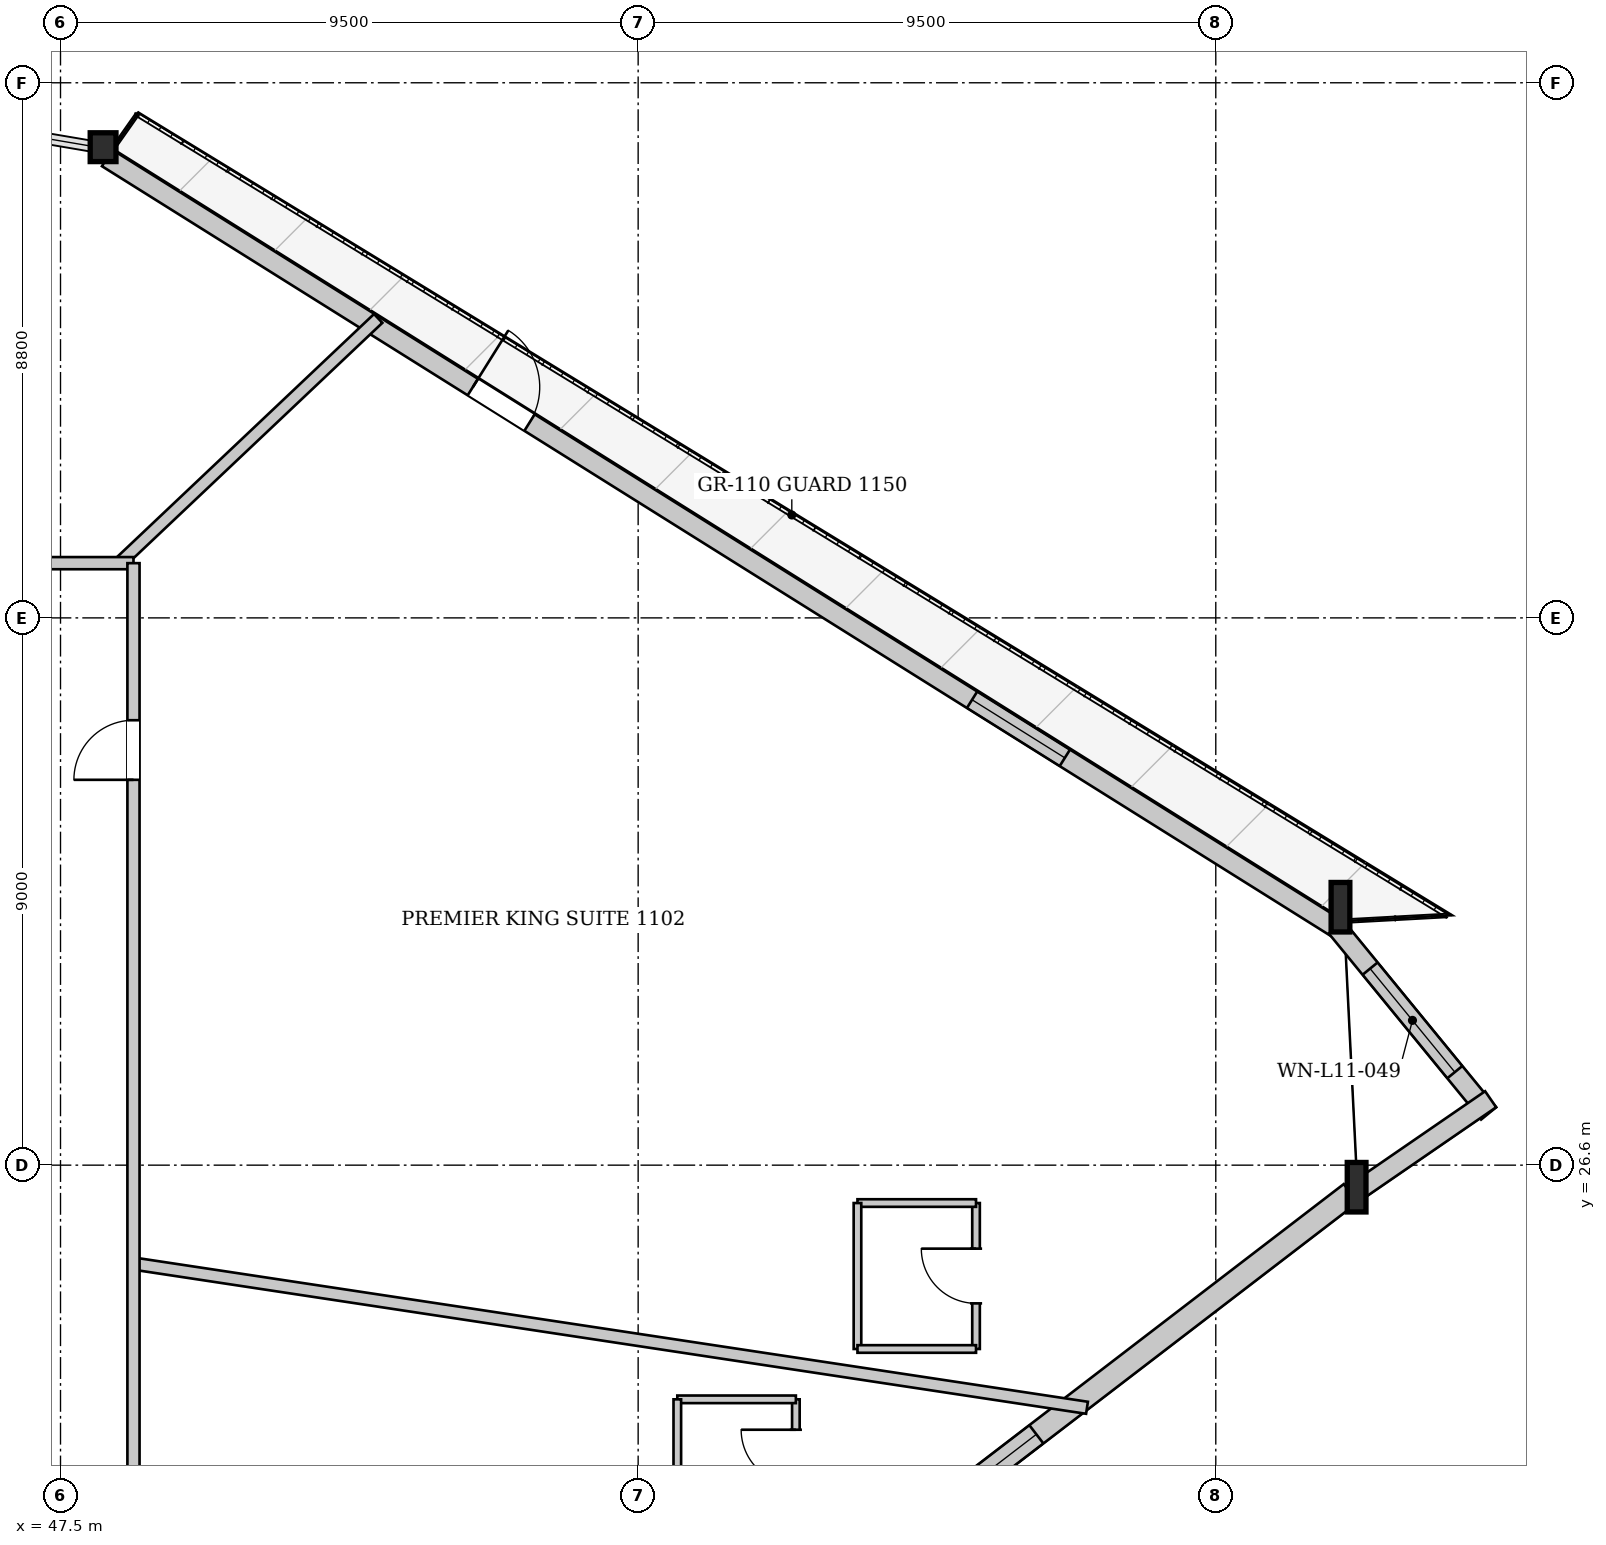
"""IFC4 building model, lengths in metres.
Left out: names, types, materials, properties, quantities, classifications, styles, units other than length and angle.
Written with IfcOpenShell. Run it as: python <this file> out.ifc"""

import sys

from ifc_helpers import new_model, si_unit, direction, frame, frame_2d, origin, origin_2d, place, context, subcontext, project, spatial, rectangle, i_section, extrude, source, transform, mapped, element, fill, save


model = new_model("IFC4")
c1 = context("Model", 3, precision=1e-05, world=origin(), true_north=direction((0.0, 1.0)))
c2 = subcontext(c1, "Body", "Model", "MODEL_VIEW")
j1 = project(units=[si_unit("LENGTHUNIT", "METRE"), si_unit("PLANEANGLEUNIT", "RADIAN")], contexts=[c1])
p1 = place(None, origin())
s1 = spatial("IfcSite", under=j1, at=p1, CompositionType="ELEMENT")
p2 = place(p1, origin())
s2 = spatial("IfcBuilding", under=s1, at=p2, CompositionType="ELEMENT")
p3 = place(p2, frame((0.0, 0.0, 47.05)))
s3 = spatial("IfcBuildingStorey", under=s2, at=p3, CompositionType="ELEMENT", Elevation=47.05)
m1 = source(origin(), c2, "Body", "SweptSolid", [
    extrude(i_section(OverallWidth=0.308, OverallDepth=0.814, WebThickness=0.021, FlangeThickness=0.04, at=origin_2d()), origin(), (0.0, 0.0, 1.0), 3.422),
])
p4 = place(p3, frame((68.836, 25.987, 0.0), z_axis=(-0.011557789288, 0.146184631177, 0.989189805404), x_axis=(-0.996889101356, -0.078817000693, 0.0)))
e1 = element("IfcColumn", 1, at=p4, inside=s3, PredefinedType="COLUMN", context=c2, shape_type="MappedRepresentation", body=[
    mapped(m1, transform((0.0, 0.0, 0.0), x_axis=(1.0, 0.0, 0.0), y_axis=(0.0, 1.0, 0.0), z_axis=(0.0, 0.0, 1.0), scale=1.0)),
])
m2 = source(origin(), c2, "Body", "SweptSolid", [
    extrude(i_section(OverallWidth=0.308, OverallDepth=0.814, WebThickness=0.021, FlangeThickness=0.04, at=origin_2d()), origin(), (0.0, 0.0, 1.0), 3.417),
])
p5 = place(p3, frame((68.606, 30.613, 0.0), z_axis=(-0.032146436914, 0.13394348714, 0.990467439569), x_axis=(-0.972387301981, -0.233372952475, 0.0)))
e2 = element("IfcColumn", 2, at=p5, inside=s3, PredefinedType="COLUMN", context=c2, shape_type="MappedRepresentation", body=[
    mapped(m2, transform((0.0, 0.0, 0.0), x_axis=(1.0, 0.0, 0.0), y_axis=(0.0, 1.0, 0.0), z_axis=(0.0, 0.0, 1.0), scale=1.0)),
])
m3 = source(origin(), c2, "Body", "SweptSolid", [
    extrude(i_section(OverallWidth=0.424, OverallDepth=0.474, WebThickness=0.043, FlangeThickness=0.068, at=origin_2d()), origin(), (0.0, 0.0, 1.0), 3.399),
])
p6 = place(p3, frame((48.351, 43.299, 0.0), z_axis=(-0.088695640975, 0.02434641481, 0.995761183898), x_axis=(-0.264702744163, -0.96433005617, 0.0)))
e3 = element("IfcColumn", 3, at=p6, inside=s3, PredefinedType="COLUMN", context=c2, shape_type="MappedRepresentation", body=[
    mapped(m3, transform((0.0, 0.0, 0.0), x_axis=(1.0, 0.0, 0.0), y_axis=(0.0, 1.0, 0.0), z_axis=(0.0, 0.0, 1.0), scale=1.0)),
])
p7 = place(p3, frame((48.266, 43.164, 0.0), z_axis=(0.0, 0.0, 1.0), x_axis=(0.847483127108, -0.530822333053, 0.0)))
e4 = element("IfcWall", 4, at=p7, inside=s3, PredefinedType="SOLIDWALL", context=c2, shape_type="SweptSolid", body=[
    extrude(rectangle(XDim=23.9, YDim=0.32, at=frame_2d((11.95, 0.0))), origin(), (0.0, 0.0, 1.0), 2.592),
])
p8 = place(p7, frame((7.098, 0.0, 0.0)))
e5 = element("IfcOpeningElement", 5, at=p8, cuts=e4, PredefinedType="OPENING", context=c2, shape_type="SweptSolid", body=[
    extrude(rectangle(XDim=1.1, YDim=2.3, at=frame_2d((0.55, 1.15))), frame((0.0, 0.17, 0.0), z_axis=(0.0, -1.0, 0.0), x_axis=(1.0, 0.0, 0.0)), (0.0, 0.0, 1.0), 0.34),
])
p9 = place(p7, frame((16.786, 0.0, 0.272)))
e6 = element("IfcOpeningElement", 6, at=p9, cuts=e4, PredefinedType="OPENING", context=c2, shape_type="SweptSolid", body=[
    extrude(rectangle(XDim=1.8, YDim=2.2, at=frame_2d((0.9, 1.1))), frame((0.0, 0.17, 0.0), z_axis=(0.0, -1.0, 0.0), x_axis=(1.0, 0.0, 0.0)), (0.0, 0.0, 1.0), 0.34),
])
p10 = place(p3, frame((68.482, 30.512, 0.0), z_axis=(0.0, 0.0, 1.0), x_axis=(0.63340917895, -0.773817040405, 0.0)))
e7 = element("IfcWall", 7, at=p10, inside=s3, PredefinedType="SOLIDWALL", context=c2, shape_type="SweptSolid", body=[
    extrude(rectangle(XDim=3.956, YDim=0.32, at=frame_2d((1.978, 0.0))), origin(), (0.0, 0.0, 1.0), 2.592),
])
p11 = place(p10, frame((0.878, 0.0, 0.222)))
e8 = element("IfcOpeningElement", 8, at=p11, cuts=e7, PredefinedType="OPENING", context=c2, shape_type="SweptSolid", body=[
    extrude(rectangle(XDim=2.2, YDim=2.25, at=frame_2d((1.1, 1.125))), frame((0.0, 0.17, 0.0), z_axis=(0.0, -1.0, 0.0), x_axis=(1.0, 0.0, 0.0)), (0.0, 0.0, 1.0), 0.34),
])
p12 = place(p3, frame((71.02, 27.684, 0.0), z_axis=(0.0, 0.0, 1.0), x_axis=(-0.823923227302, -0.56670143419, 0.0)))
e9 = element("IfcWall", 9, at=p12, inside=s3, PredefinedType="SOLIDWALL", context=c2, shape_type="SweptSolid", body=[
    extrude(rectangle(XDim=2.761, YDim=0.32, at=frame_2d((1.38, 0.0))), origin(), (0.0, 0.0, 1.0), 2.592),
])
p13 = place(p3, frame((68.72, 26.138, 0.0), z_axis=(0.0, 0.0, 1.0), x_axis=(-0.793606361292, -0.608431543657, 0.0)))
e10 = element("IfcWall", 10, at=p13, inside=s3, PredefinedType="SOLIDWALL", context=c2, shape_type="SweptSolid", body=[
    extrude(rectangle(XDim=24.521, YDim=0.38, at=frame_2d((12.261, 0.0))), origin(), (0.0, 0.0, 1.0), 2.592),
])
p14 = place(p13, frame((6.516, 0.0, 0.222)))
e11 = element("IfcOpeningElement", 11, at=p14, cuts=e10, PredefinedType="OPENING", context=c2, shape_type="SweptSolid", body=[
    extrude(rectangle(XDim=2.2, YDim=2.25, at=frame_2d((1.1, 1.125))), frame((0.0, 0.2, 0.0), z_axis=(0.0, -1.0, 0.0), x_axis=(1.0, 0.0, 0.0)), (0.0, 0.0, 1.0), 0.4),
])
p15 = place(p13, frame((16.555, 0.0, 0.222)))
e12 = element("IfcOpeningElement", 12, at=p15, cuts=e10, PredefinedType="OPENING", context=c2, shape_type="SweptSolid", body=[
    extrude(rectangle(XDim=2.2, YDim=2.25, at=frame_2d((1.1, 1.125))), frame((0.0, 0.2, 0.0), z_axis=(0.0, -1.0, 0.0), x_axis=(1.0, 0.0, 0.0)), (0.0, 0.0, 1.0), 0.4),
])
p16 = place(p3, frame((48.7, 24.982, 0.0), z_axis=(0.0, 0.0, 1.0), x_axis=(0.988756783169, -0.149532684514, 0.0)))
e13 = element("IfcWall", 13, at=p16, inside=s3, PredefinedType="PARTITIONING", context=c2, shape_type="SweptSolid", body=[
    extrude(rectangle(XDim=15.86, YDim=0.2, at=frame_2d((7.93, 0.0))), origin(), (0.0, 0.0, 1.0), 3.3),
])
p17 = place(p3, frame((48.469, 36.5, 0.0), z_axis=(0.0, 0.0, 1.0), x_axis=(0.726587633049, 0.687073803532, 0.0)))
e14 = element("IfcWall", 14, at=p17, inside=s3, PredefinedType="PARTITIONING", context=c2, shape_type="SweptSolid", body=[
    extrude(rectangle(XDim=5.857, YDim=0.2, at=frame_2d((2.929, 0.0))), origin(), (0.0, 0.0, 1.0), 3.3),
])
p18 = place(p3, frame((59.594, 20.849, 0.0), z_axis=(0.0, 0.0, 1.0), x_axis=(0.0, 1.0, 0.0)))
e15 = element("IfcWall", 15, at=p18, inside=s3, PredefinedType="PARTITIONING", context=c2, shape_type="SweptSolid", body=[
    extrude(rectangle(XDim=1.9, YDim=0.125, at=frame_2d((0.95, 0.0))), origin(), (0.0, 0.0, 1.0), 3.3),
])
p19 = place(p18, frame((0.5, 0.0, 0.0)))
e16 = element("IfcOpeningElement", 16, at=p19, cuts=e15, PredefinedType="OPENING", context=c2, shape_type="SweptSolid", body=[
    extrude(rectangle(XDim=0.9, YDim=2.1, at=frame_2d((0.45, 1.05))), frame((0.0, 0.073, 0.0), z_axis=(0.0, -1.0, 0.0), x_axis=(1.0, 0.0, 0.0)), (0.0, 0.0, 1.0), 0.145),
])
p20 = place(p3, frame((59.594, 22.749, 0.0), z_axis=(0.0, 0.0, 1.0), x_axis=(-1.0, 0.0, 0.0)))
e17 = element("IfcWall", 17, at=p20, inside=s3, PredefinedType="PARTITIONING", context=c2, shape_type="SweptSolid", body=[
    extrude(rectangle(XDim=1.95, YDim=0.125, at=frame_2d((0.975, 0.0))), origin(), (0.0, 0.0, 1.0), 3.3),
])
p21 = place(p3, frame((57.644, 22.749, 0.0), z_axis=(0.0, 0.0, 1.0), x_axis=(0.0, -1.0, 0.0)))
e18 = element("IfcWall", 18, at=p21, inside=s3, PredefinedType="PARTITIONING", context=c2, shape_type="SweptSolid", body=[
    extrude(rectangle(XDim=1.9, YDim=0.125, at=frame_2d((0.95, 0.0))), origin(), (0.0, 0.0, 1.0), 3.3),
])
p22 = place(p3, frame((62.557, 23.577, 0.0), z_axis=(0.0, 0.0, 1.0), x_axis=(0.0, 1.0, 0.0)))
e19 = element("IfcWall", 19, at=p22, inside=s3, PredefinedType="PARTITIONING", context=c2, shape_type="SweptSolid", body=[
    extrude(rectangle(XDim=2.4, YDim=0.125, at=frame_2d((1.2, 0.0))), origin(), (0.0, 0.0, 1.0), 3.3),
])
p23 = place(p22, frame((0.75, 0.0, 0.0)))
e20 = element("IfcOpeningElement", 20, at=p23, cuts=e19, PredefinedType="OPENING", context=c2, shape_type="SweptSolid", body=[
    extrude(rectangle(XDim=0.9, YDim=2.1, at=frame_2d((0.45, 1.05))), frame((0.0, 0.073, 0.0), z_axis=(0.0, -1.0, 0.0), x_axis=(1.0, 0.0, 0.0)), (0.0, 0.0, 1.0), 0.145),
])
p24 = place(p3, frame((62.557, 25.977, 0.0), z_axis=(0.0, 0.0, 1.0), x_axis=(-1.0, 0.0, 0.0)))
e21 = element("IfcWall", 21, at=p24, inside=s3, PredefinedType="PARTITIONING", context=c2, shape_type="SweptSolid", body=[
    extrude(rectangle(XDim=1.95, YDim=0.125, at=frame_2d((0.975, 0.0))), origin(), (0.0, 0.0, 1.0), 3.3),
])
p25 = place(p3, frame((60.607, 25.977, 0.0), z_axis=(0.0, 0.0, 1.0), x_axis=(0.0, -1.0, 0.0)))
e22 = element("IfcWall", 22, at=p25, inside=s3, PredefinedType="PARTITIONING", context=c2, shape_type="SweptSolid", body=[
    extrude(rectangle(XDim=2.4, YDim=0.125, at=frame_2d((1.2, 0.0))), origin(), (0.0, 0.0, 1.0), 3.3),
])
p26 = place(p3, frame((60.607, 23.577, 0.0), z_axis=(0.0, 0.0, 1.0), x_axis=(1.0, 0.0, 0.0)))
e23 = element("IfcWall", 23, at=p26, inside=s3, PredefinedType="PARTITIONING", context=c2, shape_type="SweptSolid", body=[
    extrude(rectangle(XDim=1.95, YDim=0.125, at=frame_2d((0.975, 0.0))), origin(), (0.0, 0.0, 1.0), 3.3),
])
p27 = place(p3, frame((27.3, 36.5, 0.0), z_axis=(0.0, 0.0, 1.0), x_axis=(1.0, 0.0, 0.0)))
e24 = element("IfcWall", 24, at=p27, inside=s3, PredefinedType="PARTITIONING", context=c2, shape_type="SweptSolid", body=[
    extrude(rectangle(XDim=21.4, YDim=0.2, at=frame_2d((10.7, 0.0))), origin(), (0.0, 0.0, 1.0), 3.3),
])
p28 = place(p27, frame((17.909, 0.0, 0.0)))
e25 = element("IfcOpeningElement", 25, at=p28, cuts=e24, PredefinedType="OPENING", context=c2, shape_type="SweptSolid", body=[
    extrude(rectangle(XDim=0.98, YDim=2.15, at=frame_2d((0.49, 1.075))), frame((0.0, 0.11, 0.0), z_axis=(0.0, -1.0, 0.0), x_axis=(1.0, 0.0, 0.0)), (0.0, 0.0, 1.0), 0.22),
])
p29 = place(p3, frame((48.7, 16.7, 0.0), z_axis=(0.0, 0.0, 1.0), x_axis=(0.0, 1.0, 0.0)))
e26 = element("IfcWall", 26, at=p29, inside=s3, PredefinedType="PARTITIONING", context=c2, shape_type="SweptSolid", body=[
    extrude(rectangle(XDim=19.8, YDim=0.2, at=frame_2d((9.9, 0.0))), origin(), (0.0, 0.0, 1.0), 3.3),
])
p30 = place(p29, frame((1.545, 0.0, 0.0)))
e27 = element("IfcOpeningElement", 27, at=p30, cuts=e26, PredefinedType="OPENING", context=c2, shape_type="SweptSolid", body=[
    extrude(rectangle(XDim=0.98, YDim=2.15, at=frame_2d((0.49, 1.075))), frame((0.0, 0.11, 0.0), z_axis=(0.0, -1.0, 0.0), x_axis=(1.0, 0.0, 0.0)), (0.0, 0.0, 1.0), 0.22),
])
p31 = place(p29, frame((16.237, 0.0, 0.0)))
e28 = element("IfcOpeningElement", 28, at=p31, cuts=e26, PredefinedType="OPENING", context=c2, shape_type="SweptSolid", body=[
    extrude(rectangle(XDim=0.98, YDim=2.15, at=frame_2d((0.49, 1.075))), frame((0.0, 0.11, 0.0), z_axis=(0.0, -1.0, 0.0), x_axis=(1.0, 0.0, 0.0)), (0.0, 0.0, 1.0), 0.22),
])
m4 = source(origin(), c2, "Body", "SweptSolid", [
    extrude(rectangle(XDim=1.1, YDim=2.3, at=frame_2d((0.55, 1.15))), frame((0.0, 0.025, 0.0), z_axis=(0.0, -1.0, 0.0), x_axis=(1.0, 0.0, 0.0)), (0.0, 0.0, 1.0), 0.05),
])
p32 = place(p8, origin())
e29 = element("IfcDoor", 29, at=p32, inside=s3, OperationType="SINGLE_SWING_LEFT", PredefinedType="DOOR", context=c2, shape_type="MappedRepresentation", body=[
    mapped(m4, transform((0.0, 0.0, 0.0), x_axis=(1.0, 0.0, 0.0), y_axis=(0.0, 1.0, 0.0), z_axis=(0.0, 0.0, 1.0), scale=1.0)),
])
fill(e5, e29)
m5 = source(origin(), c2, "Body", "SweptSolid", [
    extrude(rectangle(XDim=1.8, YDim=2.2, at=frame_2d((0.9, 1.1))), frame((0.0, 0.03, 0.0), z_axis=(0.0, -1.0, 0.0), x_axis=(1.0, 0.0, 0.0)), (0.0, 0.0, 1.0), 0.06),
])
p33 = place(p9, origin())
e30 = element("IfcWindow", 30, at=p33, inside=s3, PartitioningType="SINGLE_PANEL", PredefinedType="WINDOW", context=c2, shape_type="MappedRepresentation", body=[
    mapped(m5, transform((0.0, 0.0, 0.0), x_axis=(1.0, 0.0, 0.0), y_axis=(0.0, 1.0, 0.0), z_axis=(0.0, 0.0, 1.0), scale=1.0)),
])
fill(e6, e30)
m6 = source(origin(), c2, "Body", "SweptSolid", [
    extrude(rectangle(XDim=2.2, YDim=2.25, at=frame_2d((1.1, 1.125))), frame((0.0, 0.03, 0.0), z_axis=(0.0, -1.0, 0.0), x_axis=(1.0, 0.0, 0.0)), (0.0, 0.0, 1.0), 0.06),
])
p34 = place(p11, origin())
e31 = element("IfcWindow", 31, at=p34, inside=s3, PartitioningType="SINGLE_PANEL", PredefinedType="WINDOW", context=c2, shape_type="MappedRepresentation", body=[
    mapped(m6, transform((0.0, 0.0, 0.0), x_axis=(1.0, 0.0, 0.0), y_axis=(0.0, 1.0, 0.0), z_axis=(0.0, 0.0, 1.0), scale=1.0)),
])
fill(e8, e31)
p35 = place(p14, origin())
e32 = element("IfcWindow", 32, at=p35, inside=s3, PartitioningType="SINGLE_PANEL", PredefinedType="WINDOW", context=c2, shape_type="MappedRepresentation", body=[
    mapped(m6, transform((0.0, 0.0, 0.0), x_axis=(1.0, 0.0, 0.0), y_axis=(0.0, 1.0, 0.0), z_axis=(0.0, 0.0, 1.0), scale=1.0)),
])
fill(e11, e32)
m7 = source(origin(), c2, "Body", "SweptSolid", [
    extrude(rectangle(XDim=0.9, YDim=2.1, at=frame_2d((0.45, 1.05))), frame((0.0, 0.025, 0.0), z_axis=(0.0, -1.0, 0.0), x_axis=(1.0, 0.0, 0.0)), (0.0, 0.0, 1.0), 0.05),
])
p36 = place(p19, origin())
e33 = element("IfcDoor", 33, at=p36, inside=s3, OperationType="SINGLE_SWING_RIGHT", PredefinedType="DOOR", context=c2, shape_type="MappedRepresentation", body=[
    mapped(m7, transform((0.0, 0.0, 0.0), x_axis=(1.0, 0.0, 0.0), y_axis=(0.0, 1.0, 0.0), z_axis=(0.0, 0.0, 1.0), scale=1.0)),
])
fill(e16, e33)
p37 = place(p23, origin())
e34 = element("IfcDoor", 34, at=p37, inside=s3, OperationType="SINGLE_SWING_RIGHT", PredefinedType="DOOR", context=c2, shape_type="MappedRepresentation", body=[
    mapped(m7, transform((0.0, 0.0, 0.0), x_axis=(1.0, 0.0, 0.0), y_axis=(0.0, 1.0, 0.0), z_axis=(0.0, 0.0, 1.0), scale=1.0)),
])
fill(e20, e34)
m8 = source(origin(), c2, "Body", "SweptSolid", [
    extrude(rectangle(XDim=0.98, YDim=2.15, at=frame_2d((0.49, 1.075))), frame((0.0, 0.025, 0.0), z_axis=(0.0, -1.0, 0.0), x_axis=(1.0, 0.0, 0.0)), (0.0, 0.0, 1.0), 0.05),
])
p38 = place(p31, origin())
e35 = element("IfcDoor", 35, at=p38, inside=s3, OperationType="SINGLE_SWING_LEFT", PredefinedType="DOOR", context=c2, shape_type="MappedRepresentation", body=[
    mapped(m8, transform((0.0, 0.0, 0.0), x_axis=(1.0, 0.0, 0.0), y_axis=(0.0, 1.0, 0.0), z_axis=(0.0, 0.0, 1.0), scale=1.0)),
])
fill(e28, e35)
save(model, sys.argv[1])
